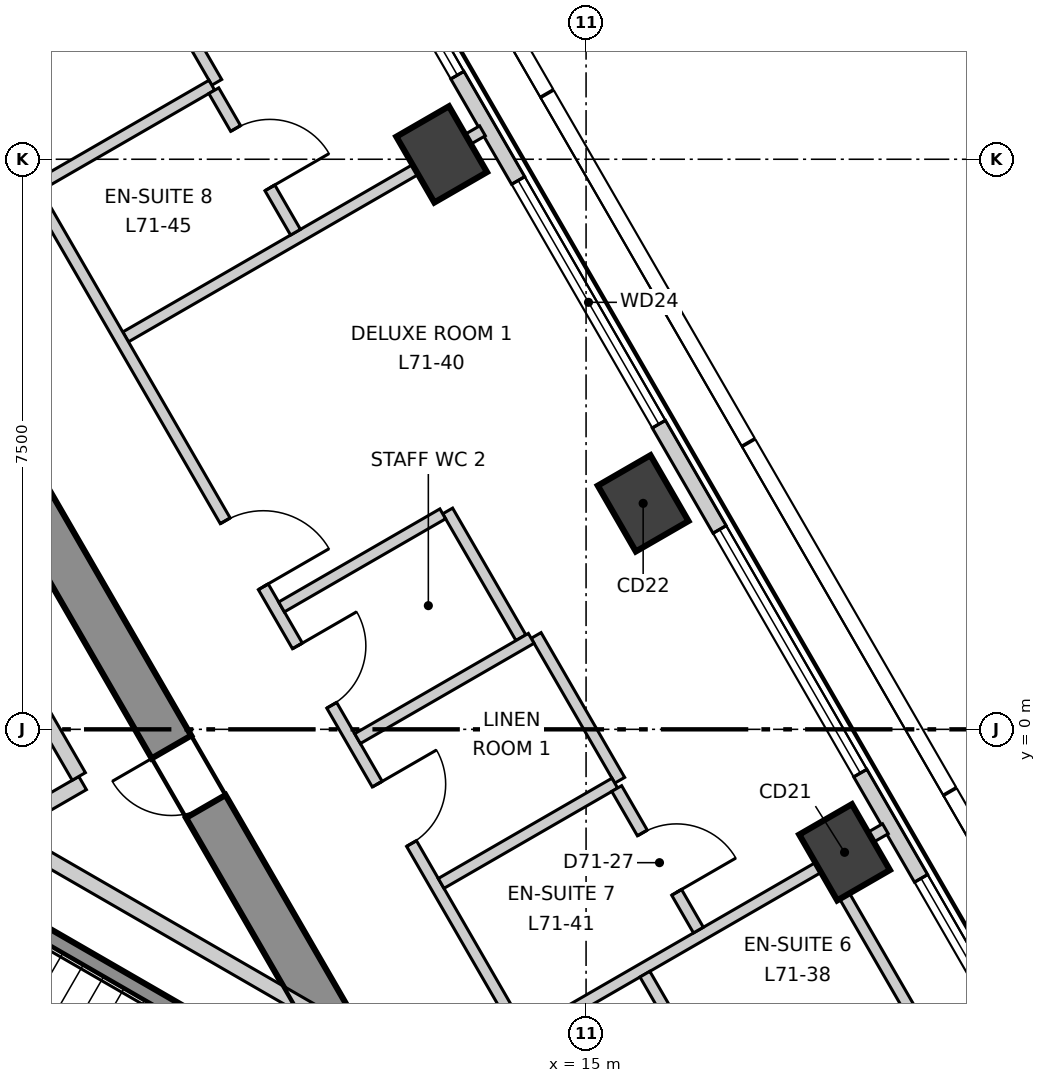
"""IFC4 building model, lengths in metres.
Left out: names, types, materials, properties, quantities, classifications, styles, units other than length and angle.
Written with IfcOpenShell. Run it as: python <this file> out.ifc"""

import sys

from ifc_helpers import new_model, si_unit, direction, frame, frame_2d, origin, origin_2d, place, context, subcontext, project, spatial, polyline, rectangle, outline, extrude, element, fill, save


model = new_model("IFC4")
c1 = context("Model", 3, precision=1e-05, world=origin(), true_north=direction((0.0, 1.0)))
c2 = subcontext(c1, "Body", "Model", "MODEL_VIEW")
j1 = project(units=[si_unit("LENGTHUNIT", "METRE"), si_unit("PLANEANGLEUNIT", "RADIAN")], contexts=[c1])
p1 = place(None, origin())
s1 = spatial("IfcSite", under=j1, at=p1, CompositionType="ELEMENT")
p2 = place(p1, origin())
s2 = spatial("IfcBuilding", under=s1, at=p2, CompositionType="ELEMENT")
p3 = place(p2, frame((0.0, 0.0, 300.7)))
s3 = spatial("IfcBuildingStorey", under=s2, at=p3, CompositionType="ELEMENT", Elevation=300.7)
p4 = place(p3, frame((12.384, -5.15, -0.3), z_axis=(0.0, 0.0, 1.0), x_axis=(-0.500000539815, 0.866025092122, 0.0)))
e1 = element("IfcWall", 1, at=p4, inside=s3, PredefinedType="SHEAR", context=c2, shape_type="SweptSolid", body=[
    extrude(outline(polyline([(-0.173, -0.301), (1.795, -0.301), (3.763, -0.301), (5.731, -0.301), (7.7, -0.301), (9.668, -0.301), (11.636, -0.301), (13.604, -0.3), (15.573, -0.3), (17.541, -0.3), (19.509, -0.3), (21.477, -0.3), (21.131, 0.3), (19.226, 0.3), (17.321, 0.3), (15.415, 0.3), (13.51, 0.3), (11.605, 0.3), (9.699, 0.3), (7.794, 0.3), (5.889, 0.3), (3.984, 0.3), (2.078, 0.3), (0.173, 0.3), (-0.173, -0.301)])), origin(), (0.0, 0.0, 1.0), 3.6),
])
p5 = place(p4, frame((16.328, 0.0, 0.3)))
e2 = element("IfcOpeningElement", 2, at=p5, cuts=e1, PredefinedType="OPENING", context=c2, shape_type="SweptSolid", body=[
    extrude(rectangle(XDim=1.0, YDim=2.1, at=frame_2d((0.5, 1.05))), frame((0.0, 0.31, 0.0), z_axis=(0.0, -1.0, 0.0), x_axis=(1.0, 0.0, 0.0)), (0.0, 0.0, 1.0), 0.621),
])
p6 = place(p4, frame((4.777, 0.0, 0.3)))
e3 = element("IfcOpeningElement", 3, at=p6, cuts=e1, PredefinedType="OPENING", context=c2, shape_type="SweptSolid", body=[
    extrude(rectangle(XDim=0.9, YDim=2.1, at=frame_2d((0.45, 1.05))), frame((0.0, 0.31, 0.0), z_axis=(0.0, -1.0, 0.0), x_axis=(1.0, 0.0, 0.0)), (0.0, 0.0, 1.0), 0.621),
])
for number, where, z_axis, x_axis in (
    (4, (18.401, -1.618, -0.3), (0.0, 0.0, 1.0), (-0.5, 0.866, 0.0)),
    (5, (15.751, 2.973, -0.3), (0.0, 0.0, 1.0), (-0.5, 0.866, 0.0)),
    (6, (13.1, 7.564, -0.3), (0.0, 0.0, 1.0), (-0.5, 0.866, 0.0)),
):
    element("IfcColumn", number, at=place(p3, frame(where, z_axis=z_axis, x_axis=x_axis)), inside=s3, PredefinedType="COLUMN", context=c2, shape_type="SweptSolid", body=[
        extrude(rectangle(XDim=1.0, YDim=0.8, at=origin_2d()), origin(), (0.0, 0.0, 1.0), 3.6),
    ])
p7 = place(p3, frame((24.96, -11.578, 0.0), z_axis=(0.0, 0.0, 1.0), x_axis=(-0.500002391419, 0.866024023094, 0.0)))
e7 = element("IfcWall", 7, at=p7, inside=s3, PredefinedType="ELEMENTEDWALL", context=c2, shape_type="SweptSolid", body=[
    extrude(rectangle(XDim=44.994, YDim=0.2, at=frame_2d((22.497, 0.0))), origin(), (0.0, 0.0, 1.0), 3.3),
])
p8 = place(p7, frame((2.103, 0.0, 0.9)))
e8 = element("IfcOpeningElement", 8, at=p8, cuts=e7, PredefinedType="OPENING", context=c2, shape_type="SweptSolid", body=[
    extrude(rectangle(XDim=3.7, YDim=2.2, at=frame_2d((1.85, 1.1))), frame((0.0, 0.11, 0.0), z_axis=(0.0, -1.0, 0.0), x_axis=(1.0, 0.0, 0.0)), (0.0, 0.0, 1.0), 0.22),
])
p9 = place(p7, frame((7.404, 0.0, 0.9)))
e9 = element("IfcOpeningElement", 9, at=p9, cuts=e7, PredefinedType="OPENING", context=c2, shape_type="SweptSolid", body=[
    extrude(rectangle(XDim=3.7, YDim=2.2, at=frame_2d((1.85, 1.1))), frame((0.0, 0.11, 0.0), z_axis=(0.0, -1.0, 0.0), x_axis=(1.0, 0.0, 0.0)), (0.0, 0.0, 1.0), 0.22),
])
p10 = place(p7, frame((12.705, 0.0, 0.9)))
e10 = element("IfcOpeningElement", 10, at=p10, cuts=e7, PredefinedType="OPENING", context=c2, shape_type="SweptSolid", body=[
    extrude(rectangle(XDim=3.7, YDim=2.2, at=frame_2d((1.85, 1.1))), frame((0.0, 0.11, 0.0), z_axis=(0.0, -1.0, 0.0), x_axis=(1.0, 0.0, 0.0)), (0.0, 0.0, 1.0), 0.22),
])
p11 = place(p7, frame((18.006, 0.0, 0.9)))
e11 = element("IfcOpeningElement", 11, at=p11, cuts=e7, PredefinedType="OPENING", context=c2, shape_type="SweptSolid", body=[
    extrude(rectangle(XDim=3.7, YDim=2.2, at=frame_2d((1.85, 1.1))), frame((0.0, 0.11, 0.0), z_axis=(0.0, -1.0, 0.0), x_axis=(1.0, 0.0, 0.0)), (0.0, 0.0, 1.0), 0.22),
])
p12 = place(p7, frame((23.308, 0.0, 0.9)))
e12 = element("IfcOpeningElement", 12, at=p12, cuts=e7, PredefinedType="OPENING", context=c2, shape_type="SweptSolid", body=[
    extrude(rectangle(XDim=3.7, YDim=2.2, at=frame_2d((1.85, 1.1))), frame((0.0, 0.11, 0.0), z_axis=(0.0, -1.0, 0.0), x_axis=(1.0, 0.0, 0.0)), (0.0, 0.0, 1.0), 0.22),
])
p13 = place(p7, frame((28.609, 0.0, 0.9)))
e13 = element("IfcOpeningElement", 13, at=p13, cuts=e7, PredefinedType="OPENING", context=c2, shape_type="SweptSolid", body=[
    extrude(rectangle(XDim=3.7, YDim=2.2, at=frame_2d((1.85, 1.1))), frame((0.0, 0.11, 0.0), z_axis=(0.0, -1.0, 0.0), x_axis=(1.0, 0.0, 0.0)), (0.0, 0.0, 1.0), 0.22),
])
p14 = place(p7, frame((33.91, 0.0, 0.9)))
e14 = element("IfcOpeningElement", 14, at=p14, cuts=e7, PredefinedType="OPENING", context=c2, shape_type="SweptSolid", body=[
    extrude(rectangle(XDim=3.7, YDim=2.2, at=frame_2d((1.85, 1.1))), frame((0.0, 0.11, 0.0), z_axis=(0.0, -1.0, 0.0), x_axis=(1.0, 0.0, 0.0)), (0.0, 0.0, 1.0), 0.22),
])
p15 = place(p7, frame((39.211, 0.0, 0.9)))
e15 = element("IfcOpeningElement", 15, at=p15, cuts=e7, PredefinedType="OPENING", context=c2, shape_type="SweptSolid", body=[
    extrude(rectangle(XDim=3.7, YDim=2.2, at=frame_2d((1.85, 1.1))), frame((0.0, 0.11, 0.0), z_axis=(0.0, -1.0, 0.0), x_axis=(1.0, 0.0, 0.0)), (0.0, 0.0, 1.0), 0.22),
])
p16 = place(p3, frame((8.942, 5.163, 0.0), z_axis=(0.0, 0.0, 1.0), x_axis=(0.866006352826, 0.500032995777, 0.0)))
e16 = element("IfcWall", 16, at=p16, inside=s3, PredefinedType="PARTITIONING", context=c2, shape_type="SweptSolid", body=[
    extrude(rectangle(XDim=5.422, YDim=0.15, at=frame_2d((2.711, 0.0))), origin(), (0.0, 0.0, 1.0), 2.8),
])
p17 = place(p3, frame((0.075, 20.37, 0.0), z_axis=(0.0, 0.0, 1.0), x_axis=(0.500009775255, -0.866019759965, 0.0)))
e17 = element("IfcWall", 17, at=p17, inside=s3, PredefinedType="PARTITIONING", context=c2, shape_type="SweptSolid", body=[
    extrude(rectangle(XDim=35.207, YDim=0.15, at=frame_2d((17.604, 0.0))), origin(), (0.0, 0.0, 1.0), 3.3),
])
p18 = place(p17, frame((31.307, 0.0, 0.0)))
e18 = element("IfcOpeningElement", 18, at=p18, cuts=e17, PredefinedType="OPENING", context=c2, shape_type="SweptSolid", body=[
    extrude(rectangle(XDim=1.0, YDim=2.1, at=frame_2d((0.5, 1.05))), frame((0.0, 0.085, 0.0), z_axis=(0.0, -1.0, 0.0), x_axis=(1.0, 0.0, 0.0)), (0.0, 0.0, 1.0), 0.17),
])
p19 = place(p17, frame((20.355, 0.0, 0.0)))
e19 = element("IfcOpeningElement", 19, at=p19, cuts=e17, PredefinedType="OPENING", context=c2, shape_type="SweptSolid", body=[
    extrude(rectangle(XDim=1.0, YDim=2.1, at=frame_2d((0.5, 1.05))), frame((0.0, 0.085, 0.0), z_axis=(0.0, -1.0, 0.0), x_axis=(1.0, 0.0, 0.0)), (0.0, 0.0, 1.0), 0.17),
])
p20 = place(p17, frame((24.355, 0.0, 0.0)))
e20 = element("IfcOpeningElement", 20, at=p20, cuts=e17, PredefinedType="OPENING", context=c2, shape_type="SweptSolid", body=[
    extrude(rectangle(XDim=0.9, YDim=2.1, at=frame_2d((0.45, 1.05))), frame((0.0, 0.085, 0.0), z_axis=(0.0, -1.0, 0.0), x_axis=(1.0, 0.0, 0.0)), (0.0, 0.0, 1.0), 0.17),
])
p21 = place(p17, frame((22.255, 0.0, 0.0)))
e21 = element("IfcOpeningElement", 21, at=p21, cuts=e17, PredefinedType="OPENING", context=c2, shape_type="SweptSolid", body=[
    extrude(rectangle(XDim=0.9, YDim=2.1, at=frame_2d((0.45, 1.05))), frame((0.0, 0.085, 0.0), z_axis=(0.0, -1.0, 0.0), x_axis=(1.0, 0.0, 0.0)), (0.0, 0.0, 1.0), 0.17),
])
p22 = place(p17, frame((8.453, 0.0, 0.0)))
e22 = element("IfcOpeningElement", 22, at=p22, cuts=e17, PredefinedType="OPENING", context=c2, shape_type="SweptSolid", body=[
    extrude(rectangle(XDim=1.0, YDim=2.1, at=frame_2d((0.5, 1.05))), frame((0.0, 0.085, 0.0), z_axis=(0.0, -1.0, 0.0), x_axis=(1.0, 0.0, 0.0)), (0.0, 0.0, 1.0), 0.17),
])
p23 = place(p17, frame((13.753, 0.0, 0.0)))
e23 = element("IfcOpeningElement", 23, at=p23, cuts=e17, PredefinedType="OPENING", context=c2, shape_type="SweptSolid", body=[
    extrude(rectangle(XDim=0.9, YDim=2.1, at=frame_2d((0.45, 1.05))), frame((0.0, 0.085, 0.0), z_axis=(0.0, -1.0, 0.0), x_axis=(1.0, 0.0, 0.0)), (0.0, 0.0, 1.0), 0.17),
])
p24 = place(p17, frame((11.553, 0.0, 0.0)))
e24 = element("IfcOpeningElement", 24, at=p24, cuts=e17, PredefinedType="OPENING", context=c2, shape_type="SweptSolid", body=[
    extrude(rectangle(XDim=0.9, YDim=2.1, at=frame_2d((0.45, 1.05))), frame((0.0, 0.085, 0.0), z_axis=(0.0, -1.0, 0.0), x_axis=(1.0, 0.0, 0.0)), (0.0, 0.0, 1.0), 0.17),
])
p25 = place(p17, frame((2.951, 0.0, 0.0)))
e25 = element("IfcOpeningElement", 25, at=p25, cuts=e17, PredefinedType="OPENING", context=c2, shape_type="SweptSolid", body=[
    extrude(rectangle(XDim=1.0, YDim=2.1, at=frame_2d((0.5, 1.05))), frame((0.0, 0.085, 0.0), z_axis=(0.0, -1.0, 0.0), x_axis=(1.0, 0.0, 0.0)), (0.0, 0.0, 1.0), 0.17),
])
p26 = place(p3, frame((7.941, 12.322, 0.0), z_axis=(0.0, 0.0, 1.0), x_axis=(0.500077893725, -0.86598042715, 0.0)))
e26 = element("IfcWall", 26, at=p26, inside=s3, PredefinedType="PARTITIONING", context=c2, shape_type="SweptSolid", body=[
    extrude(rectangle(XDim=4.4, YDim=0.15, at=frame_2d((2.2, 0.0))), origin(), (0.0, 0.0, 1.0), 3.3),
])
p27 = place(p3, frame((14.343, 1.235, 0.0), z_axis=(0.0, 0.0, 1.0), x_axis=(0.500077893725, -0.86598042715, 0.0)))
e27 = element("IfcWall", 27, at=p27, inside=s3, PredefinedType="PARTITIONING", context=c2, shape_type="SweptSolid", body=[
    extrude(rectangle(XDim=2.2, YDim=0.15, at=frame_2d((1.1, 0.0))), origin(), (0.0, 0.0, 1.0), 3.3),
])
p28 = place(p3, frame((7.791, 7.155, 0.0), z_axis=(0.0, 0.0, 1.0), x_axis=(0.866042279195, 0.499970769793, 0.0)))
e28 = element("IfcWall", 28, at=p28, inside=s3, PredefinedType="PARTITIONING", context=c2, shape_type="SweptSolid", body=[
    extrude(rectangle(XDim=2.638, YDim=0.15, at=frame_2d((1.319, 0.0))), origin(), (0.0, 0.0, 1.0), 3.3),
])
p29 = place(p3, frame((13.179, 2.873, 0.0), z_axis=(0.0, 0.0, 1.0), x_axis=(0.500271259635, -0.865868735308, 0.0)))
e29 = element("IfcWall", 29, at=p29, inside=s3, PredefinedType="PARTITIONING", context=c2, shape_type="SweptSolid", body=[
    extrude(rectangle(XDim=1.925, YDim=0.15, at=frame_2d((0.963, 0.0))), origin(), (0.0, 0.0, 1.0), 3.3),
])
p30 = place(p3, frame((10.993, 1.61, 0.0), z_axis=(0.0, 0.0, 1.0), x_axis=(0.865983065851, 0.500073324283, 0.0)))
e30 = element("IfcWall", 30, at=p30, inside=s3, PredefinedType="PARTITIONING", context=c2, shape_type="SweptSolid", body=[
    extrude(rectangle(XDim=2.449, YDim=0.15, at=frame_2d((1.225, 0.0))), origin(), (0.0, 0.0, 1.0), 3.3),
])
for number, where, z_axis, x_axis in (
    (31, (11.993, -0.122, 0.0), (0.0, 0.0, 1.0), (0.866, 0.5, 0.0)),
    (32, (13.093, -2.027, 0.0), (0.0, 0.0, 1.0), (0.866, 0.5, 0.0)),
):
    element("IfcWall", number, at=place(p3, frame(where, z_axis=z_axis, x_axis=x_axis)), inside=s3, PredefinedType="PARTITIONING", context=c2, shape_type="SweptSolid", body=[
        extrude(rectangle(XDim=2.638, YDim=0.15, at=frame_2d((1.319, 0.0))), origin(), (0.0, 0.0, 1.0), 3.3),
    ])
p31 = place(p3, frame((14.243, -4.019, 0.0), z_axis=(0.0, 0.0, 1.0), x_axis=(0.866006352826, 0.500032995777, 0.0)))
e33 = element("IfcWall", 33, at=p31, inside=s3, PredefinedType="PARTITIONING", context=c2, shape_type="SweptSolid", body=[
    extrude(rectangle(XDim=5.422, YDim=0.15, at=frame_2d((2.711, 0.0))), origin(), (0.0, 0.0, 1.0), 3.3),
])
p32 = place(p3, frame((18.189, -1.827, 0.0), z_axis=(0.0, 0.0, 1.0), x_axis=(0.499898410332, -0.866084048662, 0.0)))
e34 = element("IfcWall", 34, at=p32, inside=s3, PredefinedType="PARTITIONING", context=c2, shape_type="SweptSolid", body=[
    extrude(rectangle(XDim=5.525, YDim=0.15, at=frame_2d((2.763, 0.0))), origin(), (0.0, 0.0, 1.0), 2.6),
])
p33 = place(p3, frame((15.774, -3.221, 0.0), z_axis=(0.0, 0.0, 1.0), x_axis=(0.499898410332, -0.866084048662, 0.0)))
e35 = element("IfcWall", 35, at=p33, inside=s3, PredefinedType="PARTITIONING", context=c2, shape_type="SweptSolid", body=[
    extrude(rectangle(XDim=5.525, YDim=0.15, at=frame_2d((2.763, 0.0))), origin(), (0.0, 0.0, 1.0), 3.3),
])
p34 = place(p33, frame((1.075, 0.0, 0.0)))
e36 = element("IfcOpeningElement", 36, at=p34, cuts=e35, PredefinedType="OPENING", context=c2, shape_type="SweptSolid", body=[
    extrude(rectangle(XDim=0.9, YDim=2.1, at=frame_2d((0.45, 1.05))), frame((0.0, 0.085, 0.0), z_axis=(0.0, -1.0, 0.0), x_axis=(1.0, 0.0, 0.0)), (0.0, 0.0, 1.0), 0.17),
])
p35 = place(p3, frame((10.102, 8.402, 0.0), z_axis=(0.0, 0.0, 1.0), x_axis=(0.499961633463, -0.866047553582, 0.0)))
e37 = element("IfcWall", 37, at=p35, inside=s3, PredefinedType="PARTITIONING", context=c2, shape_type="SweptSolid", body=[
    extrude(rectangle(XDim=2.15, YDim=0.15, at=frame_2d((1.075, 0.0))), origin(), (0.0, 0.0, 1.0), 3.3),
])
p36 = place(p35, frame((0.575, 0.0, 0.0)))
e38 = element("IfcOpeningElement", 38, at=p36, cuts=e37, PredefinedType="OPENING", context=c2, shape_type="SweptSolid", body=[
    extrude(rectangle(XDim=0.9, YDim=2.1, at=frame_2d((0.45, 1.05))), frame((0.0, 0.085, 0.0), z_axis=(0.0, -1.0, 0.0), x_axis=(1.0, 0.0, 0.0)), (0.0, 0.0, 1.0), 0.17),
])
p37 = place(p3, frame((15.403, -0.779, 0.0), z_axis=(0.0, 0.0, 1.0), x_axis=(0.499961633463, -0.866047553582, 0.0)))
e39 = element("IfcWall", 39, at=p37, inside=s3, PredefinedType="PARTITIONING", context=c2, shape_type="SweptSolid", body=[
    extrude(rectangle(XDim=2.15, YDim=0.15, at=frame_2d((1.075, 0.0))), origin(), (0.0, 0.0, 1.0), 3.3),
])
p38 = place(p37, frame((0.676, 0.0, 0.0)))
e40 = element("IfcOpeningElement", 40, at=p38, cuts=e39, PredefinedType="OPENING", context=c2, shape_type="SweptSolid", body=[
    extrude(rectangle(XDim=0.9, YDim=2.1, at=frame_2d((0.45, 1.05))), frame((0.0, 0.085, 0.0), z_axis=(0.0, -1.0, 0.0), x_axis=(1.0, 0.0, 0.0)), (0.0, 0.0, 1.0), 0.17),
])
p39 = place(p3, frame((6.642, -1.708, 0.0), z_axis=(0.0, 0.0, 1.0), x_axis=(0.866043441391, 0.499968756647, 0.0)))
e41 = element("IfcWall", 41, at=p39, inside=s3, PredefinedType="SOLIDWALL", context=c2, shape_type="SweptSolid", body=[
    extrude(rectangle(XDim=2.002, YDim=0.2, at=frame_2d((1.001, 0.0))), origin(), (0.0, 0.0, 1.0), 3.3),
])
p40 = place(p3, frame((6.826, 1.978, 0.0), z_axis=(0.0, 0.0, 1.0), x_axis=(0.499990139034, -0.866031096941, 0.0)))
e42 = element("IfcWall", 42, at=p40, inside=s3, PredefinedType="SOLIDWALL", context=c2, shape_type="SweptSolid", body=[
    extrude(rectangle(XDim=3.0, YDim=0.2, at=frame_2d((1.5, 0.0))), origin(), (0.0, 0.0, 1.0), 3.3),
])
p41 = place(p3, frame((7.383, -1.395, 0.0), z_axis=(0.0, 0.0, 1.0), x_axis=(0.865968383994, -0.500098748171, 0.0)))
e43 = element("IfcWall", 43, at=p41, inside=s3, PredefinedType="SOLIDWALL", context=c2, shape_type="SweptSolid", body=[
    extrude(rectangle(XDim=4.867, YDim=0.2, at=frame_2d((2.434, 0.0))), origin(), (0.0, 0.0, 1.0), 3.3),
])
p42 = place(p3, frame((6.529, -1.922, 0.0), z_axis=(0.0, 0.0, 1.0), x_axis=(0.866068467981, -0.499925403204, 0.0)))
e44 = element("IfcWall", 44, at=p42, inside=s3, PredefinedType="SOLIDWALL", context=c2, shape_type="SweptSolid", body=[
    extrude(rectangle(XDim=6.665, YDim=0.2, at=frame_2d((3.332, 0.0))), origin(), (0.0, 0.0, 1.0), 3.3),
])
p43 = place(p9, origin())
e45 = element("IfcWindow", 45, at=p43, inside=s3, PartitioningType="SINGLE_PANEL", PredefinedType="WINDOW", context=c2, shape_type="SweptSolid", body=[
    extrude(rectangle(XDim=3.7, YDim=2.2, at=frame_2d((1.85, 1.1))), frame((0.0, 0.03, 0.0), z_axis=(0.0, -1.0, 0.0), x_axis=(1.0, 0.0, 0.0)), (0.0, 0.0, 1.0), 0.06),
])
fill(e9, e45)
p44 = place(p10, origin())
e46 = element("IfcWindow", 46, at=p44, inside=s3, PartitioningType="SINGLE_PANEL", PredefinedType="WINDOW", context=c2, shape_type="SweptSolid", body=[
    extrude(rectangle(XDim=3.7, YDim=2.2, at=frame_2d((1.85, 1.1))), frame((0.0, 0.03, 0.0), z_axis=(0.0, -1.0, 0.0), x_axis=(1.0, 0.0, 0.0)), (0.0, 0.0, 1.0), 0.06),
])
fill(e10, e46)
p45 = place(p11, origin())
e47 = element("IfcWindow", 47, at=p45, inside=s3, PartitioningType="SINGLE_PANEL", PredefinedType="WINDOW", context=c2, shape_type="SweptSolid", body=[
    extrude(rectangle(XDim=3.7, YDim=2.2, at=frame_2d((1.85, 1.1))), frame((0.0, 0.03, 0.0), z_axis=(0.0, -1.0, 0.0), x_axis=(1.0, 0.0, 0.0)), (0.0, 0.0, 1.0), 0.06),
])
fill(e11, e47)
p46 = place(p12, origin())
e48 = element("IfcWindow", 48, at=p46, inside=s3, PartitioningType="SINGLE_PANEL", PredefinedType="WINDOW", context=c2, shape_type="SweptSolid", body=[
    extrude(rectangle(XDim=3.7, YDim=2.2, at=frame_2d((1.85, 1.1))), frame((0.0, 0.03, 0.0), z_axis=(0.0, -1.0, 0.0), x_axis=(1.0, 0.0, 0.0)), (0.0, 0.0, 1.0), 0.06),
])
fill(e12, e48)
p47 = place(p19, origin())
e49 = element("IfcDoor", 49, at=p47, inside=s3, OperationType="SINGLE_SWING_LEFT", PredefinedType="DOOR", context=c2, shape_type="SweptSolid", body=[
    extrude(rectangle(XDim=1.0, YDim=2.1, at=frame_2d((0.5, 1.05))), frame((0.0, 0.025, 0.0), z_axis=(0.0, -1.0, 0.0), x_axis=(1.0, 0.0, 0.0)), (0.0, 0.0, 1.0), 0.05),
])
fill(e19, e49)
p48 = place(p38, origin())
e50 = element("IfcDoor", 50, at=p48, inside=s3, OperationType="SINGLE_SWING_LEFT", PredefinedType="DOOR", context=c2, shape_type="SweptSolid", body=[
    extrude(rectangle(XDim=0.9, YDim=2.1, at=frame_2d((0.45, 1.05))), frame((0.0, 0.025, 0.0), z_axis=(0.0, -1.0, 0.0), x_axis=(1.0, 0.0, 0.0)), (0.0, 0.0, 1.0), 0.05),
])
fill(e40, e50)
p49 = place(p20, origin())
e51 = element("IfcDoor", 51, at=p49, inside=s3, OperationType="SINGLE_SWING_RIGHT", PredefinedType="DOOR", context=c2, shape_type="SweptSolid", body=[
    extrude(rectangle(XDim=0.9, YDim=2.1, at=frame_2d((0.45, 1.05))), frame((0.0, 0.025, 0.0), z_axis=(0.0, -1.0, 0.0), x_axis=(1.0, 0.0, 0.0)), (0.0, 0.0, 1.0), 0.05),
])
fill(e20, e51)
p50 = place(p21, origin())
e52 = element("IfcDoor", 52, at=p50, inside=s3, OperationType="SINGLE_SWING_RIGHT", PredefinedType="DOOR", context=c2, shape_type="SweptSolid", body=[
    extrude(rectangle(XDim=0.9, YDim=2.1, at=frame_2d((0.45, 1.05))), frame((0.0, 0.025, 0.0), z_axis=(0.0, -1.0, 0.0), x_axis=(1.0, 0.0, 0.0)), (0.0, 0.0, 1.0), 0.05),
])
fill(e21, e52)
p51 = place(p36, origin())
e53 = element("IfcDoor", 53, at=p51, inside=s3, OperationType="SINGLE_SWING_LEFT", PredefinedType="DOOR", context=c2, shape_type="SweptSolid", body=[
    extrude(rectangle(XDim=0.9, YDim=2.1, at=frame_2d((0.45, 1.05))), frame((0.0, 0.025, 0.0), z_axis=(0.0, -1.0, 0.0), x_axis=(1.0, 0.0, 0.0)), (0.0, 0.0, 1.0), 0.05),
])
fill(e38, e53)
p52 = place(p6, origin())
e54 = element("IfcDoor", 54, at=p52, inside=s3, OperationType="SINGLE_SWING_LEFT", PredefinedType="DOOR", context=c2, shape_type="SweptSolid", body=[
    extrude(rectangle(XDim=0.9, YDim=2.1, at=frame_2d((0.45, 1.05))), frame((0.0, 0.025, 0.0), z_axis=(0.0, -1.0, 0.0), x_axis=(1.0, 0.0, 0.0)), (0.0, 0.0, 1.0), 0.05),
])
fill(e3, e54)
save(model, sys.argv[1])
